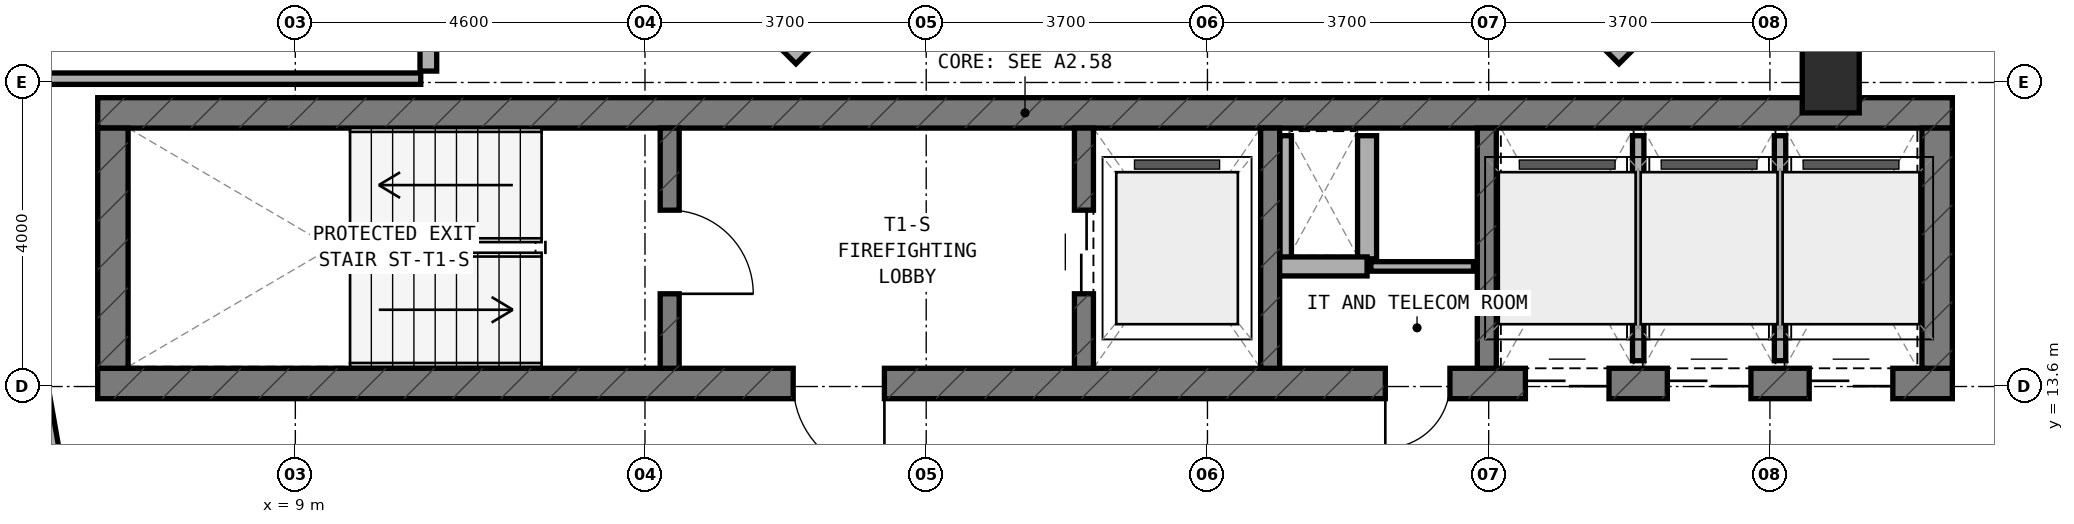
"""IFC4 building model, lengths in metres.
Left out: names, types, materials, properties, quantities, classifications, styles, units other than length and angle.
Written with IfcOpenShell. Run it as: python <this file> out.ifc"""

import sys

from ifc_helpers import new_model, si_unit, direction, frame, frame_2d, origin, origin_2d, place, context, subcontext, project, spatial, rectangle, extrude, element, fill, save


model = new_model("IFC4")
c1 = context("Model", 3, precision=1e-05, world=origin(), true_north=direction((0.0, 1.0)))
c2 = subcontext(c1, "Body", "Model", "MODEL_VIEW")
j1 = project(units=[si_unit("LENGTHUNIT", "METRE"), si_unit("PLANEANGLEUNIT", "RADIAN")], contexts=[c1])
p1 = place(None, origin())
s1 = spatial("IfcSite", under=j1, at=p1, CompositionType="ELEMENT")
p2 = place(p1, origin())
s2 = spatial("IfcBuilding", under=s1, at=p2, CompositionType="ELEMENT")
p3 = place(p2, frame((0.0, 0.0, 268.4)))
s3 = spatial("IfcBuildingStorey", under=s2, at=p3, CompositionType="ELEMENT", Elevation=268.4)
p4 = place(p3, frame((6.4, 13.64, 0.0), z_axis=(0.0, 0.0, 1.0), x_axis=(1.0, 0.0, 0.0)))
e1 = element("IfcWall", 1, at=p4, inside=s3, PredefinedType="SHEAR", context=c2, shape_type="SweptSolid", body=[
    extrude(rectangle(XDim=24.4, YDim=0.4, at=frame_2d((12.2, 0.0))), origin(), (0.0, 0.0, 1.0), 3.6),
])
p5 = place(p4, frame((9.15, 0.0, 0.0)))
e2 = element("IfcOpeningElement", 2, at=p5, cuts=e1, PredefinedType="OPENING", context=c2, shape_type="SweptSolid", body=[
    extrude(rectangle(XDim=1.2, YDim=2.15, at=frame_2d((0.6, 1.075))), frame((0.0, 0.21, 0.0), z_axis=(0.0, -1.0, 0.0), x_axis=(1.0, 0.0, 0.0)), (0.0, 0.0, 1.0), 0.42),
])
p6 = place(p4, frame((16.94, 0.0, 0.0)))
e3 = element("IfcOpeningElement", 3, at=p6, cuts=e1, PredefinedType="OPENING", context=c2, shape_type="SweptSolid", body=[
    extrude(rectangle(XDim=0.85, YDim=2.1, at=frame_2d((0.425, 1.05))), frame((0.0, 0.21, 0.0), z_axis=(0.0, -1.0, 0.0), x_axis=(1.0, 0.0, 0.0)), (0.0, 0.0, 1.0), 0.42),
])
p7 = place(p4, frame((18.783, 0.0, 0.0)))
e4 = element("IfcOpeningElement", 4, at=p7, cuts=e1, PredefinedType="OPENING", context=c2, shape_type="SweptSolid", body=[
    extrude(rectangle(XDim=1.1, YDim=2.15, at=frame_2d((0.55, 1.075))), frame((0.0, 0.21, 0.0), z_axis=(0.0, -1.0, 0.0), x_axis=(1.0, 0.0, 0.0)), (0.0, 0.0, 1.0), 0.42),
])
p8 = place(p4, frame((20.65, 0.0, 0.0)))
e5 = element("IfcOpeningElement", 5, at=p8, cuts=e1, PredefinedType="OPENING", context=c2, shape_type="SweptSolid", body=[
    extrude(rectangle(XDim=1.1, YDim=2.15, at=frame_2d((0.55, 1.075))), frame((0.0, 0.21, 0.0), z_axis=(0.0, -1.0, 0.0), x_axis=(1.0, 0.0, 0.0)), (0.0, 0.0, 1.0), 0.42),
])
p9 = place(p4, frame((22.517, 0.0, 0.0)))
e6 = element("IfcOpeningElement", 6, at=p9, cuts=e1, PredefinedType="OPENING", context=c2, shape_type="SweptSolid", body=[
    extrude(rectangle(XDim=1.1, YDim=2.15, at=frame_2d((0.55, 1.075))), frame((0.0, 0.21, 0.0), z_axis=(0.0, -1.0, 0.0), x_axis=(1.0, 0.0, 0.0)), (0.0, 0.0, 1.0), 0.42),
])
p10 = place(p3, frame((6.4, 17.2, 0.0), z_axis=(0.0, 0.0, 1.0), x_axis=(1.0, 0.0, 0.0)))
e7 = element("IfcWall", 7, at=p10, inside=s3, PredefinedType="SHEAR", context=c2, shape_type="SweptSolid", body=[
    extrude(rectangle(XDim=24.4, YDim=0.4, at=frame_2d((12.2, 0.0))), origin(), (0.0, 0.0, 1.0), 3.6),
])
for number, where, z_axis, x_axis in (
    (8, (6.6, 13.84, 0.0), (0.0, 0.0, 1.0), (0.0, 1.0, 0.0)),
    (9, (30.6, 13.84, 0.0), (0.0, 0.0, 1.0), (0.0, 1.0, 0.0)),
):
    element("IfcWall", number, at=place(p3, frame(where, z_axis=z_axis, x_axis=x_axis)), inside=s3, PredefinedType="SHEAR", context=c2, shape_type="SweptSolid", body=[
        extrude(rectangle(XDim=3.16, YDim=0.4, at=frame_2d((1.58, 0.0))), origin(), (0.0, 0.0, 1.0), 3.6),
    ])
p11 = place(p3, frame((13.925, 13.84, 0.0), z_axis=(0.0, 0.0, 1.0), x_axis=(0.0, 1.0, 0.0)))
e10 = element("IfcWall", 10, at=p11, inside=s3, PredefinedType="STANDARD", context=c2, shape_type="SweptSolid", body=[
    extrude(rectangle(XDim=3.16, YDim=0.25, at=frame_2d((1.58, 0.0))), origin(), (0.0, 0.0, 1.0), 3.32),
])
p12 = place(p11, frame((0.98, 0.0, 0.0)))
e11 = element("IfcOpeningElement", 11, at=p12, cuts=e10, PredefinedType="OPENING", context=c2, shape_type="SweptSolid", body=[
    extrude(rectangle(XDim=1.1, YDim=2.15, at=frame_2d((0.55, 1.075))), frame((0.0, 0.135, 0.0), z_axis=(0.0, -1.0, 0.0), x_axis=(1.0, 0.0, 0.0)), (0.0, 0.0, 1.0), 0.27),
])
p13 = place(p3, frame((19.375, 13.84, 0.0), z_axis=(0.0, 0.0, 1.0), x_axis=(0.0, 1.0, 0.0)))
e12 = element("IfcWall", 12, at=p13, inside=s3, PredefinedType="STANDARD", context=c2, shape_type="SweptSolid", body=[
    extrude(rectangle(XDim=3.16, YDim=0.25, at=frame_2d((1.58, 0.0))), origin(), (0.0, 0.0, 1.0), 3.32),
])
p14 = place(p13, frame((0.98, 0.0, 0.0)))
e13 = element("IfcOpeningElement", 13, at=p14, cuts=e12, PredefinedType="OPENING", context=c2, shape_type="SweptSolid", body=[
    extrude(rectangle(XDim=1.1, YDim=2.15, at=frame_2d((0.55, 1.075))), frame((0.0, 0.135, 0.0), z_axis=(0.0, -1.0, 0.0), x_axis=(1.0, 0.0, 0.0)), (0.0, 0.0, 1.0), 0.27),
])
for number, where, z_axis, x_axis in (
    (14, (21.825, 13.84, 0.0), (0.0, 0.0, 1.0), (0.0, 1.0, 0.0)),
    (15, (24.675, 13.84, 0.0), (0.0, 0.0, 1.0), (0.0, 1.0, 0.0)),
):
    element("IfcWall", number, at=place(p3, frame(where, z_axis=z_axis, x_axis=x_axis)), inside=s3, PredefinedType="STANDARD", context=c2, shape_type="SweptSolid", body=[
        extrude(rectangle(XDim=3.16, YDim=0.25, at=frame_2d((1.58, 0.0))), origin(), (0.0, 0.0, 1.0), 3.32),
    ])
p15 = place(p3, frame((29.2, 17.65, 0.0), z_axis=(0.0, 0.0, 1.0), x_axis=(1.0, 0.0, 0.0)))
e16 = element("IfcColumn", 16, at=p15, inside=s3, PredefinedType="COLUMN", context=c2, shape_type="SweptSolid", body=[
    extrude(rectangle(XDim=0.75, YDim=0.9, at=origin_2d()), origin(), (0.0, 0.0, 1.0), 3.6),
])
p16 = place(p3, frame((4.518, 19.856, 0.0), z_axis=(0.0, 0.0, 1.0), x_axis=(0.172801004781, -0.98495675679, 0.0)))
e17 = element("IfcWall", 17, at=p16, inside=s3, PredefinedType="STANDARD", context=c2, shape_type="SweptSolid", body=[
    extrude(rectangle(XDim=8.165, YDim=0.26, at=frame_2d((4.083, 0.0))), origin(), (0.0, 0.0, 1.0), 3.32),
])
p17 = place(p16, frame((0.317, 0.0, 0.85)))
e18 = element("IfcOpeningElement", 18, at=p17, cuts=e17, PredefinedType="OPENING", context=c2, shape_type="SweptSolid", body=[
    extrude(rectangle(XDim=1.5, YDim=1.5, at=frame_2d((0.75, 0.75))), frame((0.0, 0.14, 0.0), z_axis=(0.0, -1.0, 0.0), x_axis=(1.0, 0.0, 0.0)), (0.0, 0.0, 1.0), 0.28),
])
p18 = place(p16, frame((4.21, 0.0, 0.85)))
e19 = element("IfcOpeningElement", 19, at=p18, cuts=e17, PredefinedType="OPENING", context=c2, shape_type="SweptSolid", body=[
    extrude(rectangle(XDim=2.1, YDim=1.5, at=frame_2d((1.05, 0.75))), frame((0.0, 0.14, 0.0), z_axis=(0.0, -1.0, 0.0), x_axis=(1.0, 0.0, 0.0)), (0.0, 0.0, 1.0), 0.28),
])
for number, where, z_axis, x_axis in (
    (20, (26.322, 17.938, 0.0), (0.0, 0.0, 1.0), (0.707, 0.707, 0.0)),
    (21, (14.044, 19.572, 0.0), (0.0, 0.0, 1.0), (0.707, -0.707, 0.0)),
):
    element("IfcWall", number, at=place(p3, frame(where, z_axis=z_axis, x_axis=x_axis)), inside=s3, PredefinedType="STANDARD", context=c2, shape_type="SweptSolid", body=[
        extrude(rectangle(XDim=2.311, YDim=0.26, at=frame_2d((1.155, 0.0))), origin(), (0.0, 0.0, 1.0), 3.32),
    ])
p19 = place(p3, frame((22.03, 15.28, 0.0), z_axis=(0.0, 0.0, 1.0), x_axis=(0.0, 1.0, 0.0)))
e22 = element("IfcWall", 22, at=p19, inside=s3, PredefinedType="PARTITIONING", context=c2, shape_type="SweptSolid", body=[
    extrude(rectangle(XDim=1.62, YDim=0.15, at=frame_2d((0.81, 0.0))), origin(), (0.0, 0.0, 1.0), 3.32),
])
p20 = place(p3, frame((23.1, 15.28, 0.0), z_axis=(0.0, 0.0, 1.0), x_axis=(0.0, 1.0, 0.0)))
e23 = element("IfcWall", 23, at=p20, inside=s3, PredefinedType="SOLIDWALL", context=c2, shape_type="SweptSolid", body=[
    extrude(rectangle(XDim=1.62, YDim=0.25, at=frame_2d((0.81, 0.0))), origin(), (0.0, 0.0, 1.0), 3.32),
])
p21 = place(p3, frame((21.95, 15.18, 0.0), z_axis=(0.0, 0.0, 1.0), x_axis=(1.0, 0.0, 0.0)))
e24 = element("IfcWall", 24, at=p21, inside=s3, PredefinedType="SOLIDWALL", context=c2, shape_type="SweptSolid", body=[
    extrude(rectangle(XDim=1.15, YDim=0.25, at=frame_2d((0.575, 0.0))), origin(), (0.0, 0.0, 1.0), 3.32),
])
p22 = place(p3, frame((23.15, 15.18, 0.0), z_axis=(0.0, 0.0, 1.0), x_axis=(1.0, 0.0, 0.0)))
e25 = element("IfcWall", 25, at=p22, inside=s3, PredefinedType="PARTITIONING", context=c2, shape_type="SweptSolid", body=[
    extrude(rectangle(XDim=1.35, YDim=0.125, at=frame_2d((0.675, 0.0))), origin(), (0.0, 0.0, 1.0), 3.32),
])
p23 = place(p3, frame((26.667, 13.94, 0.0), z_axis=(0.0, 0.0, 1.0), x_axis=(0.0, 1.0, 0.0)))
e26 = element("IfcWall", 26, at=p23, inside=s3, PredefinedType="PARTITIONING", context=c2, shape_type="SweptSolid", body=[
    extrude(rectangle(XDim=2.96, YDim=0.15, at=frame_2d((1.48, 0.0))), origin(), (0.0, 0.0, 1.0), 3.32),
])
p24 = place(p3, frame((28.533, 13.94, 0.0), z_axis=(0.0, 0.0, 1.0), x_axis=(0.0, 1.0, 0.0)))
e27 = element("IfcWall", 27, at=p24, inside=s3, PredefinedType="PARTITIONING", context=c2, shape_type="SweptSolid", body=[
    extrude(rectangle(XDim=2.96, YDim=0.15, at=frame_2d((1.48, 0.0))), origin(), (0.0, 0.0, 1.0), 2.795),
])
p25 = place(p3, frame((4.74, 17.65, 0.0), z_axis=(0.0, 0.0, 1.0), x_axis=(1.0, 0.0, 0.0)))
e28 = element("IfcWall", 28, at=p25, inside=s3, PredefinedType="PARTITIONING", context=c2, shape_type="SweptSolid", body=[
    extrude(rectangle(XDim=5.91, YDim=0.15, at=frame_2d((2.955, 0.0))), origin(), (0.0, 0.0, 1.0), 3.32),
])
p26 = place(p3, frame((10.75, 17.75, 0.0), z_axis=(0.0, 0.0, 1.0), x_axis=(0.0, 1.0, 0.0)))
e29 = element("IfcWall", 29, at=p26, inside=s3, PredefinedType="SOLIDWALL", context=c2, shape_type="SweptSolid", body=[
    extrude(rectangle(XDim=14.5, YDim=0.22, at=frame_2d((7.25, 0.0))), origin(), (0.0, 0.0, 1.0), 2.795),
])
p27 = place(p26, frame((6.02, 0.0, 0.0)))
e30 = element("IfcOpeningElement", 30, at=p27, cuts=e29, PredefinedType="OPENING", context=c2, shape_type="SweptSolid", body=[
    extrude(rectangle(XDim=1.1, YDim=2.1, at=frame_2d((0.55, 1.05))), frame((0.0, 0.12, 0.0), z_axis=(0.0, -1.0, 0.0), x_axis=(1.0, 0.0, 0.0)), (0.0, 0.0, 1.0), 0.24),
])
p28 = place(p12, frame((1.1, 0.0, 0.0), z_axis=(0.0, 0.0, 1.0), x_axis=(-1.0, 0.0, 0.0)))
e31 = element("IfcDoor", 31, at=p28, inside=s3, OperationType="SINGLE_SWING_RIGHT", PredefinedType="DOOR", context=c2, shape_type="SweptSolid", body=[
    extrude(rectangle(XDim=1.1, YDim=2.15, at=frame_2d((0.55, 1.075))), frame((0.0, 0.025, 0.0), z_axis=(0.0, -1.0, 0.0), x_axis=(1.0, 0.0, 0.0)), (0.0, 0.0, 1.0), 0.05),
])
fill(e11, e31)
p29 = place(p5, frame((1.2, 0.0, 0.0), z_axis=(0.0, 0.0, 1.0), x_axis=(-1.0, 0.0, 0.0)))
e32 = element("IfcDoor", 32, at=p29, inside=s3, OperationType="SINGLE_SWING_LEFT", PredefinedType="DOOR", context=c2, shape_type="SweptSolid", body=[
    extrude(rectangle(XDim=1.2, YDim=2.15, at=frame_2d((0.6, 1.075))), frame((0.0, 0.025, 0.0), z_axis=(0.0, -1.0, 0.0), x_axis=(1.0, 0.0, 0.0)), (0.0, 0.0, 1.0), 0.05),
])
fill(e2, e32)
p30 = place(p14, origin())
e33 = element("IfcDoor", 33, at=p30, inside=s3, OperationType="DOUBLE_DOOR_SLIDING", PredefinedType="DOOR", context=c2, shape_type="SweptSolid", body=[
    extrude(rectangle(XDim=1.1, YDim=2.15, at=frame_2d((0.55, 1.075))), frame((0.0, 0.025, 0.0), z_axis=(0.0, -1.0, 0.0), x_axis=(1.0, 0.0, 0.0)), (0.0, 0.0, 1.0), 0.05),
])
fill(e13, e33)
p31 = place(p6, frame((0.85, 0.0, 0.0), z_axis=(0.0, 0.0, 1.0), x_axis=(-1.0, 0.0, 0.0)))
e34 = element("IfcDoor", 34, at=p31, inside=s3, OperationType="SINGLE_SWING_RIGHT", PredefinedType="DOOR", context=c2, shape_type="SweptSolid", body=[
    extrude(rectangle(XDim=0.85, YDim=2.1, at=frame_2d((0.425, 1.05))), frame((0.0, 0.025, 0.0), z_axis=(0.0, -1.0, 0.0), x_axis=(1.0, 0.0, 0.0)), (0.0, 0.0, 1.0), 0.05),
])
fill(e3, e34)
p32 = place(p7, frame((1.1, 0.0, 0.0), z_axis=(0.0, 0.0, 1.0), x_axis=(-1.0, 0.0, 0.0)))
e35 = element("IfcDoor", 35, at=p32, inside=s3, OperationType="DOUBLE_DOOR_SLIDING", PredefinedType="DOOR", context=c2, shape_type="SweptSolid", body=[
    extrude(rectangle(XDim=1.1, YDim=2.15, at=frame_2d((0.55, 1.075))), frame((0.0, 0.025, 0.0), z_axis=(0.0, -1.0, 0.0), x_axis=(1.0, 0.0, 0.0)), (0.0, 0.0, 1.0), 0.05),
])
fill(e4, e35)
p33 = place(p8, frame((1.1, 0.0, 0.0), z_axis=(0.0, 0.0, 1.0), x_axis=(-1.0, 0.0, 0.0)))
e36 = element("IfcDoor", 36, at=p33, inside=s3, OperationType="DOUBLE_DOOR_SLIDING", PredefinedType="DOOR", context=c2, shape_type="SweptSolid", body=[
    extrude(rectangle(XDim=1.1, YDim=2.15, at=frame_2d((0.55, 1.075))), frame((0.0, 0.025, 0.0), z_axis=(0.0, -1.0, 0.0), x_axis=(1.0, 0.0, 0.0)), (0.0, 0.0, 1.0), 0.05),
])
fill(e5, e36)
p34 = place(p9, frame((1.1, 0.0, 0.0), z_axis=(0.0, 0.0, 1.0), x_axis=(-1.0, 0.0, 0.0)))
e37 = element("IfcDoor", 37, at=p34, inside=s3, OperationType="DOUBLE_DOOR_SLIDING", PredefinedType="DOOR", context=c2, shape_type="SweptSolid", body=[
    extrude(rectangle(XDim=1.1, YDim=2.15, at=frame_2d((0.55, 1.075))), frame((0.0, 0.025, 0.0), z_axis=(0.0, -1.0, 0.0), x_axis=(1.0, 0.0, 0.0)), (0.0, 0.0, 1.0), 0.05),
])
fill(e6, e37)
save(model, sys.argv[1])
